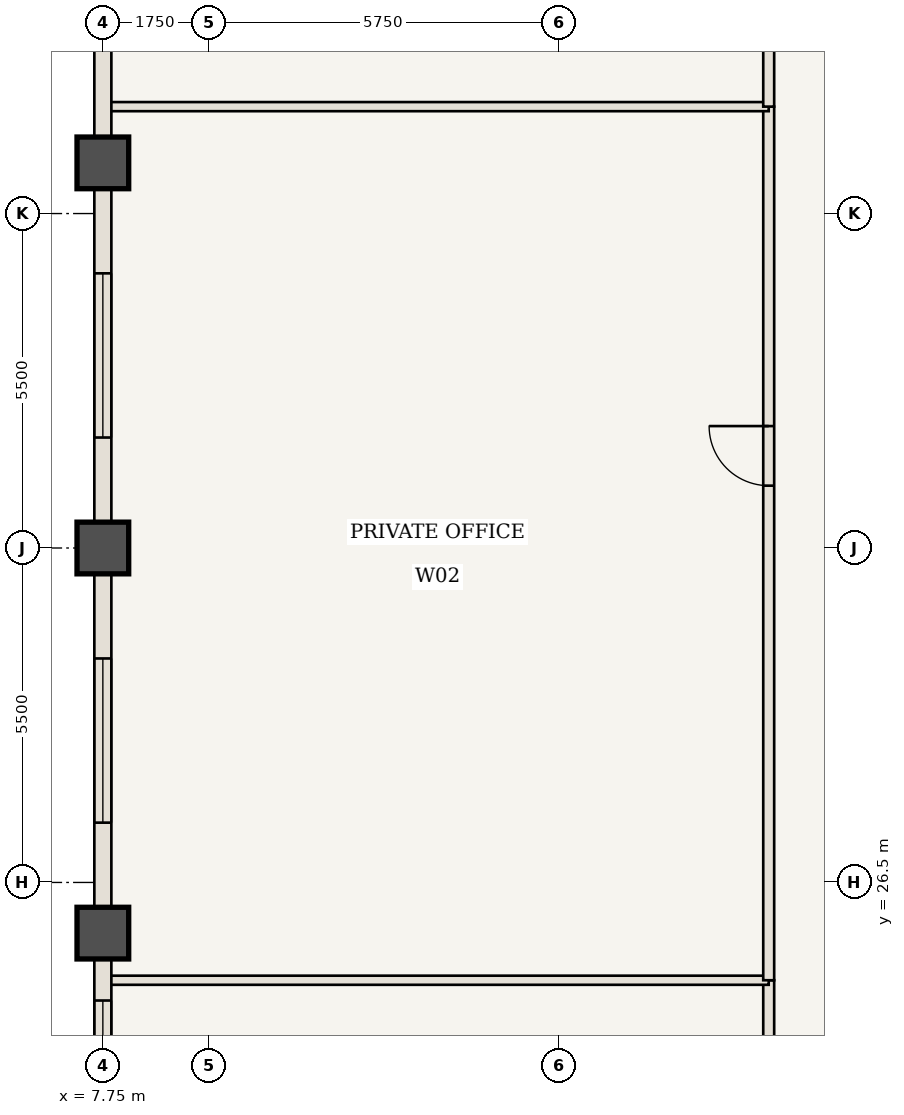
"""IFC4 building model, lengths in metres.
Left out: names, types, materials, properties, quantities, classifications, styles, units other than length and angle.
Written with IfcOpenShell. Run it as: python <this file> out.ifc"""

import sys

from ifc_helpers import new_model, si_unit, direction, frame, frame_2d, origin, origin_2d, place, context, subcontext, project, spatial, rectangle, extrude, element, fill, save


model = new_model("IFC4")
c1 = context("Model", 3, precision=1e-05, world=origin(), true_north=direction((0.0, 1.0)))
c2 = subcontext(c1, "Body", "Model", "MODEL_VIEW")
j1 = project(units=[si_unit("LENGTHUNIT", "METRE"), si_unit("PLANEANGLEUNIT", "RADIAN")], contexts=[c1])
p1 = place(None, origin())
s1 = spatial("IfcSite", under=j1, at=p1, CompositionType="ELEMENT")
p2 = place(p1, origin())
s2 = spatial("IfcBuilding", under=s1, at=p2, CompositionType="ELEMENT")
p3 = place(p2, frame((0.0, 0.0, 210.0)))
s3 = spatial("IfcBuildingStorey", under=s2, at=p3, CompositionType="ELEMENT", Elevation=210.0)
for number, where, z_axis, x_axis in (
    (1, (7.75, 25.667, 0.0), (0.0, 0.0, 1.0), (1.0, 0.0, 0.0)),
    (2, (7.75, 32.0, 0.0), (0.0, 0.0, 1.0), (1.0, 0.0, 0.0)),
    (3, (7.75, 38.333, 0.0), (0.0, 0.0, 1.0), (1.0, 0.0, 0.0)),
):
    element("IfcColumn", number, at=place(p3, frame(where, z_axis=z_axis, x_axis=x_axis)), inside=s3, PredefinedType="COLUMN", context=c2, shape_type="SweptSolid", body=[
        extrude(rectangle(XDim=0.85, YDim=0.85, at=origin_2d()), origin(), (0.0, 0.0, 1.0), 3.85),
    ])
p4 = place(p3, frame((18.7, 18.7, 0.0), z_axis=(0.0, 0.0, 1.0), x_axis=(0.0, 1.0, 0.0)))
e4 = element("IfcWall", 4, at=p4, inside=s3, PredefinedType="STANDARD", context=c2, shape_type="SweptSolid", body=[
    extrude(rectangle(XDim=6.192, YDim=0.18, at=frame_2d((3.096, 0.0))), origin(), (0.0, 0.0, 1.0), 3.685),
])
p5 = place(p4, frame((1.146, 0.0, 0.0)))
e5 = element("IfcOpeningElement", 5, at=p5, cuts=e4, PredefinedType="OPENING", context=c2, shape_type="SweptSolid", body=[
    extrude(rectangle(XDim=0.98, YDim=2.2, at=frame_2d((0.49, 1.1))), frame((0.0, 0.1, 0.0), z_axis=(0.0, -1.0, 0.0), x_axis=(1.0, 0.0, 0.0)), (0.0, 0.0, 1.0), 0.2),
])
p6 = place(p3, frame((7.81, 24.892, 0.0), z_axis=(0.0, 0.0, 1.0), x_axis=(1.0, 0.0, 0.0)))
e6 = element("IfcWall", 6, at=p6, inside=s3, PredefinedType="STANDARD", context=c2, shape_type="SweptSolid", body=[
    extrude(rectangle(XDim=10.89, YDim=0.15, at=frame_2d((5.445, 0.0))), origin(), (0.0, 0.0, 1.0), 3.685),
])
p7 = place(p3, frame((18.7, 24.892, 0.0), z_axis=(0.0, 0.0, 1.0), x_axis=(0.0, 1.0, 0.0)))
e7 = element("IfcWall", 7, at=p7, inside=s3, PredefinedType="STANDARD", context=c2, shape_type="SweptSolid", body=[
    extrude(rectangle(XDim=14.367, YDim=0.18, at=frame_2d((7.183, 0.0))), origin(), (0.0, 0.0, 1.0), 3.685),
])
p8 = place(p7, frame((8.133, 0.0, 0.0)))
e8 = element("IfcOpeningElement", 8, at=p8, cuts=e7, PredefinedType="OPENING", context=c2, shape_type="SweptSolid", body=[
    extrude(rectangle(XDim=0.98, YDim=2.2, at=frame_2d((0.49, 1.1))), frame((0.0, 0.1, 0.0), z_axis=(0.0, -1.0, 0.0), x_axis=(1.0, 0.0, 0.0)), (0.0, 0.0, 1.0), 0.2),
])
p9 = place(p3, frame((7.81, 39.258, 0.0), z_axis=(0.0, 0.0, 1.0), x_axis=(1.0, 0.0, 0.0)))
e9 = element("IfcWall", 9, at=p9, inside=s3, PredefinedType="STANDARD", context=c2, shape_type="SweptSolid", body=[
    extrude(rectangle(XDim=10.89, YDim=0.15, at=frame_2d((5.445, 0.0))), origin(), (0.0, 0.0, 1.0), 3.685),
])
p10 = place(p3, frame((18.7, 39.258, 0.0), z_axis=(0.0, 0.0, 1.0), x_axis=(0.0, 1.0, 0.0)))
e10 = element("IfcWall", 10, at=p10, inside=s3, PredefinedType="STANDARD", context=c2, shape_type="SweptSolid", body=[
    extrude(rectangle(XDim=6.042, YDim=0.18, at=frame_2d((3.021, 0.0))), origin(), (0.0, 0.0, 1.0), 3.685),
])
p11 = place(p10, frame((1.071, 0.0, 0.0)))
e11 = element("IfcOpeningElement", 11, at=p11, cuts=e10, PredefinedType="OPENING", context=c2, shape_type="SweptSolid", body=[
    extrude(rectangle(XDim=0.98, YDim=2.2, at=frame_2d((0.49, 1.1))), frame((0.0, 0.1, 0.0), z_axis=(0.0, -1.0, 0.0), x_axis=(1.0, 0.0, 0.0)), (0.0, 0.0, 1.0), 0.2),
])
p12 = place(p3, frame((7.75, 19.333, 0.0), z_axis=(0.0, 0.0, 1.0), x_axis=(0.0, 1.0, 0.0)))
e12 = element("IfcWall", 12, at=p12, inside=s3, PredefinedType="USERDEFINED", context=c2, shape_type="SweptSolid", body=[
    extrude(rectangle(XDim=6.333, YDim=0.28, at=frame_2d((3.167, 0.0))), origin(), (0.0, 0.0, 1.0), 2.985),
])
p13 = place(p12, frame((0.708, 0.0, 0.85)))
e13 = element("IfcOpeningElement", 13, at=p13, cuts=e12, PredefinedType="OPENING", context=c2, shape_type="SweptSolid", body=[
    extrude(rectangle(XDim=1.95, YDim=1.935, at=frame_2d((0.975, 0.968))), frame((0.0, 0.15, 0.0), z_axis=(0.0, -1.0, 0.0), x_axis=(1.0, 0.0, 0.0)), (0.0, 0.0, 1.0), 0.3),
])
p14 = place(p12, frame((3.625, 0.0, 0.85)))
e14 = element("IfcOpeningElement", 14, at=p14, cuts=e12, PredefinedType="OPENING", context=c2, shape_type="SweptSolid", body=[
    extrude(rectangle(XDim=1.6, YDim=1.935, at=frame_2d((0.8, 0.968))), frame((0.0, 0.15, 0.0), z_axis=(0.0, -1.0, 0.0), x_axis=(1.0, 0.0, 0.0)), (0.0, 0.0, 1.0), 0.3),
])
p15 = place(p3, frame((7.75, 25.667, 0.0), z_axis=(0.0, 0.0, 1.0), x_axis=(0.0, 1.0, 0.0)))
e15 = element("IfcWall", 15, at=p15, inside=s3, PredefinedType="USERDEFINED", context=c2, shape_type="SweptSolid", body=[
    extrude(rectangle(XDim=6.333, YDim=0.28, at=frame_2d((3.167, 0.0))), origin(), (0.0, 0.0, 1.0), 2.985),
])
p16 = place(p15, frame((1.817, 0.0, 0.85)))
e16 = element("IfcOpeningElement", 16, at=p16, cuts=e15, PredefinedType="OPENING", context=c2, shape_type="SweptSolid", body=[
    extrude(rectangle(XDim=2.7, YDim=1.935, at=frame_2d((1.35, 0.968))), frame((0.0, 0.15, 0.0), z_axis=(0.0, -1.0, 0.0), x_axis=(1.0, 0.0, 0.0)), (0.0, 0.0, 1.0), 0.3),
])
p17 = place(p3, frame((7.75, 32.0, 0.0), z_axis=(0.0, 0.0, 1.0), x_axis=(0.0, 1.0, 0.0)))
e17 = element("IfcWall", 17, at=p17, inside=s3, PredefinedType="USERDEFINED", context=c2, shape_type="SweptSolid", body=[
    extrude(rectangle(XDim=6.333, YDim=0.28, at=frame_2d((3.167, 0.0))), origin(), (0.0, 0.0, 1.0), 2.985),
])
p18 = place(p17, frame((1.817, 0.0, 0.85)))
e18 = element("IfcOpeningElement", 18, at=p18, cuts=e17, PredefinedType="OPENING", context=c2, shape_type="SweptSolid", body=[
    extrude(rectangle(XDim=2.7, YDim=1.935, at=frame_2d((1.35, 0.968))), frame((0.0, 0.15, 0.0), z_axis=(0.0, -1.0, 0.0), x_axis=(1.0, 0.0, 0.0)), (0.0, 0.0, 1.0), 0.3),
])
p19 = place(p3, frame((7.75, 38.333, 0.0), z_axis=(0.0, 0.0, 1.0), x_axis=(0.0, 1.0, 0.0)))
e19 = element("IfcWall", 19, at=p19, inside=s3, PredefinedType="USERDEFINED", context=c2, shape_type="SweptSolid", body=[
    extrude(rectangle(XDim=6.333, YDim=0.28, at=frame_2d((3.167, 0.0))), origin(), (0.0, 0.0, 1.0), 2.985),
])
p20 = place(p19, frame((3.675, 0.0, 0.85)))
e20 = element("IfcOpeningElement", 20, at=p20, cuts=e19, PredefinedType="OPENING", context=c2, shape_type="SweptSolid", body=[
    extrude(rectangle(XDim=1.95, YDim=1.935, at=frame_2d((0.975, 0.968))), frame((0.0, 0.15, 0.0), z_axis=(0.0, -1.0, 0.0), x_axis=(1.0, 0.0, 0.0)), (0.0, 0.0, 1.0), 0.3),
])
p21 = place(p8, origin())
e21 = element("IfcDoor", 21, at=p21, inside=s3, OperationType="SINGLE_SWING_RIGHT", PredefinedType="DOOR", context=c2, shape_type="SweptSolid", body=[
    extrude(rectangle(XDim=0.98, YDim=2.2, at=frame_2d((0.49, 1.1))), frame((0.0, 0.025, 0.0), z_axis=(0.0, -1.0, 0.0), x_axis=(1.0, 0.0, 0.0)), (0.0, 0.0, 1.0), 0.05),
])
fill(e8, e21)
p22 = place(p14, origin())
e22 = element("IfcWindow", 22, at=p22, inside=s3, PartitioningType="SINGLE_PANEL", PredefinedType="WINDOW", context=c2, shape_type="SweptSolid", body=[
    extrude(rectangle(XDim=1.6, YDim=1.935, at=frame_2d((0.8, 0.968))), frame((0.0, 0.03, 0.0), z_axis=(0.0, -1.0, 0.0), x_axis=(1.0, 0.0, 0.0)), (0.0, 0.0, 1.0), 0.06),
])
fill(e14, e22)
p23 = place(p16, origin())
e23 = element("IfcWindow", 23, at=p23, inside=s3, PartitioningType="SINGLE_PANEL", PredefinedType="WINDOW", context=c2, shape_type="SweptSolid", body=[
    extrude(rectangle(XDim=2.7, YDim=1.935, at=frame_2d((1.35, 0.968))), frame((0.0, 0.03, 0.0), z_axis=(0.0, -1.0, 0.0), x_axis=(1.0, 0.0, 0.0)), (0.0, 0.0, 1.0), 0.06),
])
fill(e16, e23)
p24 = place(p18, origin())
e24 = element("IfcWindow", 24, at=p24, inside=s3, PartitioningType="SINGLE_PANEL", PredefinedType="WINDOW", context=c2, shape_type="SweptSolid", body=[
    extrude(rectangle(XDim=2.7, YDim=1.935, at=frame_2d((1.35, 0.968))), frame((0.0, 0.03, 0.0), z_axis=(0.0, -1.0, 0.0), x_axis=(1.0, 0.0, 0.0)), (0.0, 0.0, 1.0), 0.06),
])
fill(e18, e24)
save(model, sys.argv[1])
